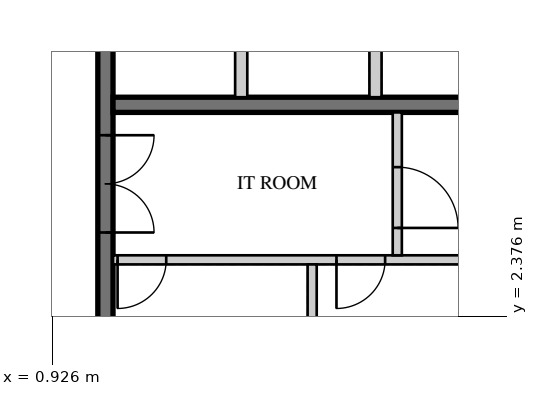
"""IFC4 building model, lengths in metres.
Left out: names, types, materials, properties, quantities, classifications, styles, units other than length and angle.
Written with IfcOpenShell. Run it as: python <this file> out.ifc"""

import sys

from ifc_helpers import new_model, si_unit, direction, frame, frame_2d, origin, place, context, subcontext, project, spatial, rectangle, extrude, element, fill, save


model = new_model("IFC4")
c1 = context("Model", 3, precision=1e-05, world=origin(), true_north=direction((0.0, 1.0)))
c2 = subcontext(c1, "Body", "Model", "MODEL_VIEW")
j1 = project(units=[si_unit("LENGTHUNIT", "METRE"), si_unit("PLANEANGLEUNIT", "RADIAN")], contexts=[c1])
p1 = place(None, origin())
s1 = spatial("IfcSite", under=j1, at=p1, CompositionType="ELEMENT")
p2 = place(p1, origin())
s2 = spatial("IfcBuilding", under=s1, at=p2, CompositionType="ELEMENT")
p3 = place(p2, frame((0.0, 0.0, 9.5)))
s3 = spatial("IfcBuildingStorey", under=s2, at=p3, CompositionType="ELEMENT", Elevation=9.5)
p4 = place(p3, frame((1.8, 1.875, 0.0), z_axis=(0.0, 0.0, 1.0), x_axis=(0.0, 1.0, 0.0)))
e1 = element("IfcWall", 1, at=p4, inside=s3, PredefinedType="SHEAR", context=c2, shape_type="SweptSolid", body=[
    extrude(rectangle(XDim=6.475, YDim=0.25, at=frame_2d((3.238, 0.0))), origin(), (0.0, 0.0, 1.0), 4.5),
])
p5 = place(p4, frame((1.875, 0.0, 0.0)))
e2 = element("IfcOpeningElement", 2, at=p5, cuts=e1, PredefinedType="OPENING", context=c2, shape_type="SweptSolid", body=[
    extrude(rectangle(XDim=1.6, YDim=2.4, at=frame_2d((0.8, 1.2))), frame((0.0, 0.135, 0.0), z_axis=(0.0, -1.0, 0.0), x_axis=(1.0, 0.0, 0.0)), (0.0, 0.0, 1.0), 0.27),
])
p6 = place(p3, frame((1.925, 5.85, 0.0), z_axis=(0.0, 0.0, 1.0), x_axis=(1.0, 0.0, 0.0)))
e3 = element("IfcWall", 3, at=p6, inside=s3, PredefinedType="SHEAR", context=c2, shape_type="SweptSolid", body=[
    extrude(rectangle(XDim=6.425, YDim=0.25, at=frame_2d((3.212, 0.0))), origin(), (0.0, 0.0, 1.0), 4.5),
])
p7 = place(p3, frame((1.925, 3.3, 0.0), z_axis=(0.0, 0.0, 1.0), x_axis=(1.0, 0.0, 0.0)))
e4 = element("IfcWall", 4, at=p7, inside=s3, PredefinedType="PARTITIONING", context=c2, shape_type="SweptSolid", body=[
    extrude(rectangle(XDim=6.425, YDim=0.15, at=frame_2d((3.212, 0.0))), origin(), (0.0, 0.0, 1.0), 4.5),
])
p8 = place(p7, frame((0.075, 0.0, 0.0)))
e5 = element("IfcOpeningElement", 5, at=p8, cuts=e4, PredefinedType="OPENING", context=c2, shape_type="SweptSolid", body=[
    extrude(rectangle(XDim=0.8, YDim=2.1, at=frame_2d((0.4, 1.05))), frame((0.0, 0.085, 0.0), z_axis=(0.0, -1.0, 0.0), x_axis=(1.0, 0.0, 0.0)), (0.0, 0.0, 1.0), 0.17),
])
p9 = place(p7, frame((3.675, 0.0, 0.0)))
e6 = element("IfcOpeningElement", 6, at=p9, cuts=e4, PredefinedType="OPENING", context=c2, shape_type="SweptSolid", body=[
    extrude(rectangle(XDim=0.8, YDim=2.1, at=frame_2d((0.4, 1.05))), frame((0.0, 0.085, 0.0), z_axis=(0.0, -1.0, 0.0), x_axis=(1.0, 0.0, 0.0)), (0.0, 0.0, 1.0), 0.17),
])
p10 = place(p3, frame((5.2, 2.125, 0.0), z_axis=(0.0, 0.0, 1.0), x_axis=(0.0, 1.0, 0.0)))
e7 = element("IfcWall", 7, at=p10, inside=s3, PredefinedType="PARTITIONING", context=c2, shape_type="SweptSolid", body=[
    extrude(rectangle(XDim=1.1, YDim=0.15, at=frame_2d((0.55, 0.0))), origin(), (0.0, 0.0, 1.0), 4.5),
])
for number, where, z_axis, x_axis in (
    (8, (4.033, 5.975, 0.0), (0.0, 0.0, 1.0), (0.0, 1.0, 0.0)),
    (9, (6.242, 5.975, 0.0), (0.0, 0.0, 1.0), (0.0, 1.0, 0.0)),
):
    element("IfcWall", number, at=place(p3, frame(where, z_axis=z_axis, x_axis=x_axis)), inside=s3, PredefinedType="PARTITIONING", context=c2, shape_type="SweptSolid", body=[
        extrude(rectangle(XDim=2.375, YDim=0.2, at=frame_2d((1.188, 0.0))), origin(), (0.0, 0.0, 1.0), 4.5),
    ])
p11 = place(p3, frame((6.6, 3.375, 0.0), z_axis=(0.0, 0.0, 1.0), x_axis=(0.0, 1.0, 0.0)))
e10 = element("IfcWall", 10, at=p11, inside=s3, PredefinedType="PARTITIONING", context=c2, shape_type="SweptSolid", body=[
    extrude(rectangle(XDim=2.35, YDim=0.15, at=frame_2d((1.175, 0.0))), origin(), (0.0, 0.0, 1.0), 4.3),
])
p12 = place(p11, frame((0.45, 0.0, 0.0)))
e11 = element("IfcOpeningElement", 11, at=p12, cuts=e10, PredefinedType="OPENING", context=c2, shape_type="SweptSolid", body=[
    extrude(rectangle(XDim=1.0, YDim=2.1, at=frame_2d((0.5, 1.05))), frame((0.0, 0.085, 0.0), z_axis=(0.0, -1.0, 0.0), x_axis=(1.0, 0.0, 0.0)), (0.0, 0.0, 1.0), 0.17),
])
p13 = place(p12, frame((1.0, 0.0, 0.0), z_axis=(0.0, 0.0, 1.0), x_axis=(-1.0, 0.0, 0.0)))
e12 = element("IfcDoor", 12, at=p13, inside=s3, OperationType="SINGLE_SWING_RIGHT", PredefinedType="DOOR", context=c2, shape_type="SweptSolid", body=[
    extrude(rectangle(XDim=1.0, YDim=2.1, at=frame_2d((0.5, 1.05))), frame((0.0, 0.025, 0.0), z_axis=(0.0, -1.0, 0.0), x_axis=(1.0, 0.0, 0.0)), (0.0, 0.0, 1.0), 0.05),
])
fill(e11, e12)
p14 = place(p5, frame((1.6, 0.0, 0.0), z_axis=(0.0, 0.0, 1.0), x_axis=(-1.0, 0.0, 0.0)))
e13 = element("IfcDoor", 13, at=p14, inside=s3, OperationType="DOUBLE_DOOR_SINGLE_SWING", PredefinedType="DOOR", context=c2, shape_type="SweptSolid", body=[
    extrude(rectangle(XDim=1.6, YDim=2.4, at=frame_2d((0.8, 1.2))), frame((0.0, 0.025, 0.0), z_axis=(0.0, -1.0, 0.0), x_axis=(1.0, 0.0, 0.0)), (0.0, 0.0, 1.0), 0.05),
])
fill(e2, e13)
p15 = place(p8, frame((0.8, 0.0, 0.0), z_axis=(0.0, 0.0, 1.0), x_axis=(-1.0, 0.0, 0.0)))
e14 = element("IfcDoor", 14, at=p15, inside=s3, OperationType="SINGLE_SWING_RIGHT", PredefinedType="DOOR", context=c2, shape_type="SweptSolid", body=[
    extrude(rectangle(XDim=0.8, YDim=2.1, at=frame_2d((0.4, 1.05))), frame((0.0, 0.025, 0.0), z_axis=(0.0, -1.0, 0.0), x_axis=(1.0, 0.0, 0.0)), (0.0, 0.0, 1.0), 0.05),
])
fill(e5, e14)
p16 = place(p9, frame((0.8, 0.0, 0.0), z_axis=(0.0, 0.0, 1.0), x_axis=(-1.0, 0.0, 0.0)))
e15 = element("IfcDoor", 15, at=p16, inside=s3, OperationType="SINGLE_SWING_RIGHT", PredefinedType="DOOR", context=c2, shape_type="SweptSolid", body=[
    extrude(rectangle(XDim=0.8, YDim=2.1, at=frame_2d((0.4, 1.05))), frame((0.0, 0.025, 0.0), z_axis=(0.0, -1.0, 0.0), x_axis=(1.0, 0.0, 0.0)), (0.0, 0.0, 1.0), 0.05),
])
fill(e6, e15)
save(model, sys.argv[1])
